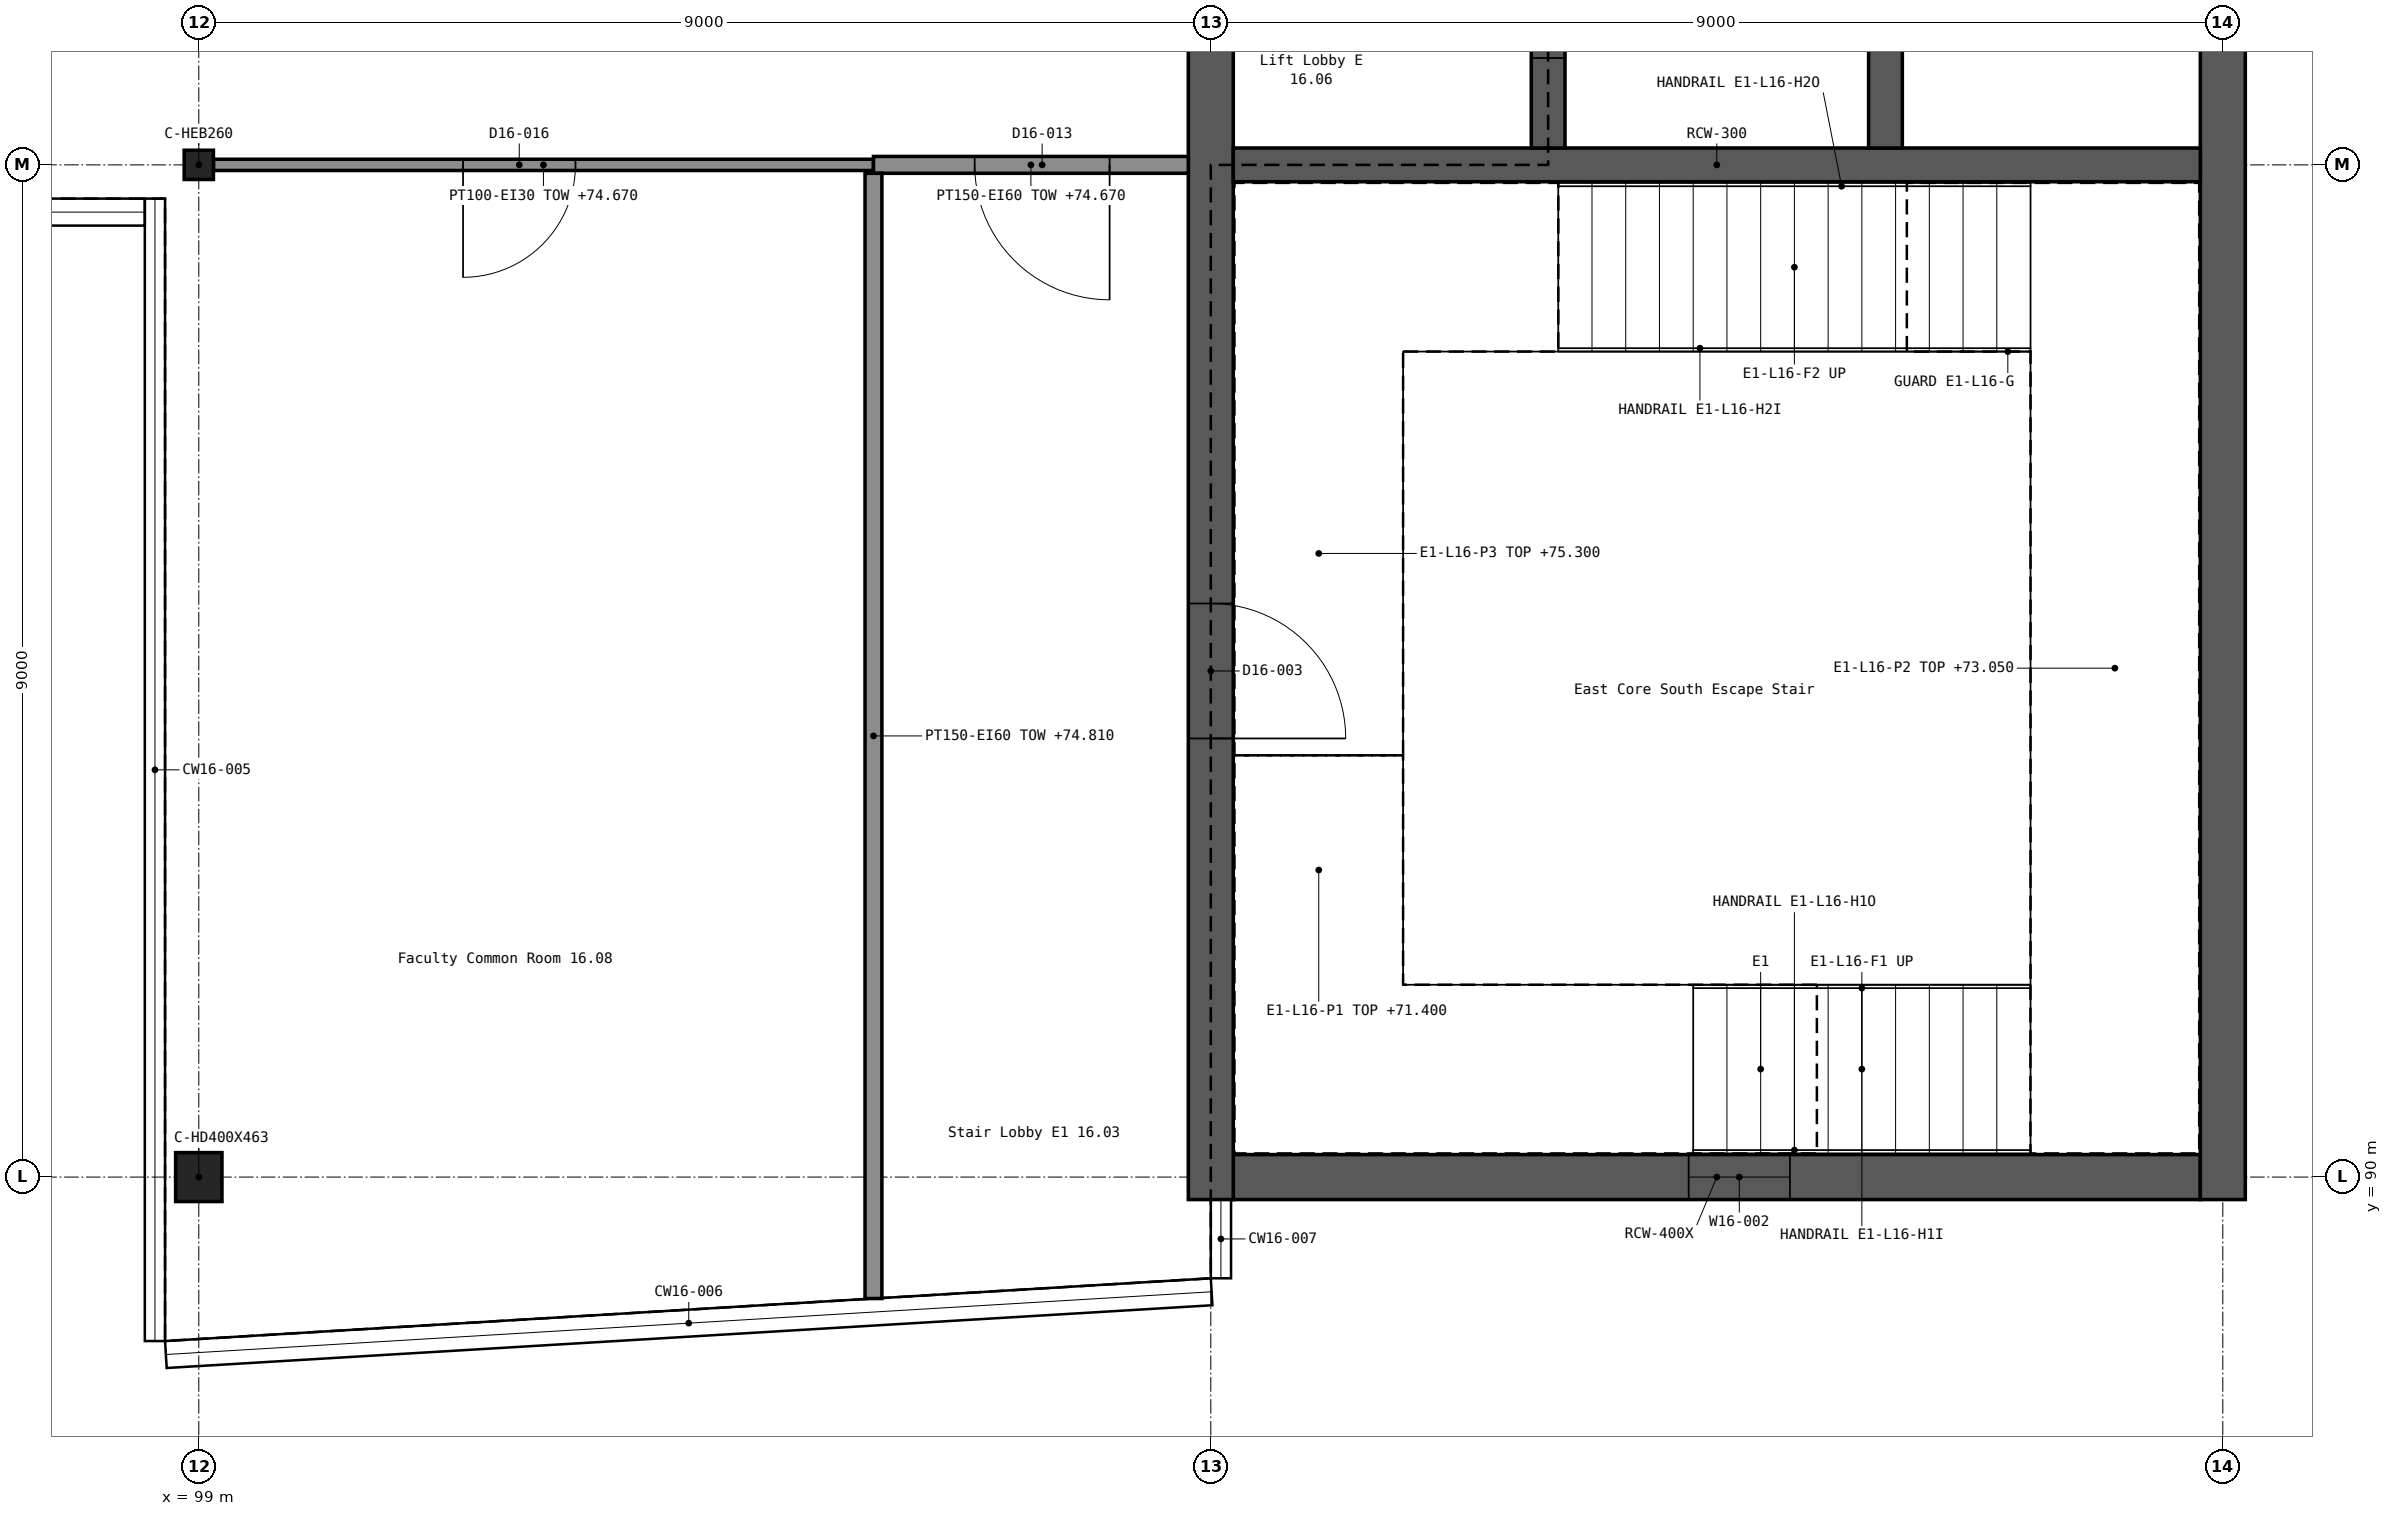
"""IFC4 building model, lengths in metres.
Left out: names, types, materials, properties, quantities, classifications, styles, units other than length and angle.
Written with IfcOpenShell. Run it as: python <this file> out.ifc"""

import sys

from ifc_helpers import new_model, si_unit, direction, frame, frame_2d, origin, origin_2d, place, context, subcontext, project, spatial, rectangle, i_section, extrude, element, fill, save


model = new_model("IFC4")
c1 = context("Model", 3, precision=1e-05, world=origin(), true_north=direction((0.0, 1.0)))
c2 = subcontext(c1, "Body", "Model", "MODEL_VIEW")
j1 = project(units=[si_unit("LENGTHUNIT", "METRE"), si_unit("PLANEANGLEUNIT", "RADIAN")], contexts=[c1])
p1 = place(None, origin())
s1 = spatial("IfcSite", under=j1, at=p1, CompositionType="ELEMENT")
p2 = place(p1, origin())
s2 = spatial("IfcBuilding", under=s1, at=p2, CompositionType="ELEMENT")
p3 = place(p2, frame((0.0, 0.0, 71.4)))
s3 = spatial("IfcBuildingStorey", under=s2, at=p3, CompositionType="ELEMENT", Elevation=71.4)
p4 = place(p3, frame((108.2, 90.0, 0.0), z_axis=(0.0, 0.0, 1.0), x_axis=(1.0, 0.0, 0.0)))
e1 = element("IfcWall", 1, at=p4, inside=s3, PredefinedType="SHEAR", context=c2, shape_type="SweptSolid", body=[
    extrude(rectangle(XDim=8.6, YDim=0.4, at=frame_2d((4.3, 0.0))), origin(), (0.0, 0.0, 1.0), 3.9),
])
p5 = place(p4, frame((4.05, 0.0, 1.2)))
e2 = element("IfcOpeningElement", 2, at=p5, cuts=e1, PredefinedType="OPENING", context=c2, shape_type="SweptSolid", body=[
    extrude(rectangle(XDim=0.9, YDim=1.5, at=frame_2d((0.45, 0.75))), frame((0.0, 0.211, 0.0), z_axis=(0.0, -1.0, 0.0), x_axis=(1.0, 0.0, 0.0)), (0.0, 0.0, 1.0), 0.422),
])
p6 = place(p3, frame((108.0, 89.8, 0.0), z_axis=(0.0, 0.0, 1.0), x_axis=(0.0, 1.0, 0.0)))
e3 = element("IfcWall", 3, at=p6, inside=s3, PredefinedType="SHEAR", context=c2, shape_type="SweptSolid", body=[
    extrude(rectangle(XDim=27.4, YDim=0.4, at=frame_2d((13.7, 0.0))), origin(), (0.0, 0.0, 1.0), 3.9),
])
p7 = place(p6, frame((4.1, 0.0, 0.0)))
e4 = element("IfcOpeningElement", 4, at=p7, cuts=e3, PredefinedType="OPENING", context=c2, shape_type="SweptSolid", body=[
    extrude(rectangle(XDim=1.2, YDim=2.1, at=frame_2d((0.6, 1.05))), frame((0.0, 0.211, 0.0), z_axis=(0.0, -1.0, 0.0), x_axis=(1.0, 0.0, 0.0)), (0.0, 0.0, 1.0), 0.422),
])
p8 = place(p6, frame((22.1, 0.0, 0.0)))
e5 = element("IfcOpeningElement", 5, at=p8, cuts=e3, PredefinedType="OPENING", context=c2, shape_type="SweptSolid", body=[
    extrude(rectangle(XDim=1.2, YDim=2.1, at=frame_2d((0.6, 1.05))), frame((0.0, 0.211, 0.0), z_axis=(0.0, -1.0, 0.0), x_axis=(1.0, 0.0, 0.0)), (0.0, 0.0, 1.0), 0.422),
])
p9 = place(p6, frame((12.5, 0.0, 0.0)))
e6 = element("IfcOpeningElement", 6, at=p9, cuts=e3, PredefinedType="OPENING", context=c2, shape_type="SweptSolid", body=[
    extrude(rectangle(XDim=2.0, YDim=2.1, at=frame_2d((1.0, 1.05))), frame((0.0, 0.211, 0.0), z_axis=(0.0, -1.0, 0.0), x_axis=(1.0, 0.0, 0.0)), (0.0, 0.0, 1.0), 0.422),
])
p10 = place(p3, frame((117.0, 89.8, 0.0), z_axis=(0.0, 0.0, 1.0), x_axis=(0.0, 1.0, 0.0)))
e7 = element("IfcWall", 7, at=p10, inside=s3, PredefinedType="SHEAR", context=c2, shape_type="SweptSolid", body=[
    extrude(rectangle(XDim=27.4, YDim=0.4, at=frame_2d((13.7, 0.0))), origin(), (0.0, 0.0, 1.0), 3.9),
])
p11 = place(p3, frame((108.2, 99.0, 0.0), z_axis=(0.0, 0.0, 1.0), x_axis=(1.0, 0.0, 0.0)))
e8 = element("IfcWall", 8, at=p11, inside=s3, PredefinedType="SHEAR", context=c2, shape_type="SweptSolid", body=[
    extrude(rectangle(XDim=8.6, YDim=0.3, at=frame_2d((4.3, 0.0))), origin(), (0.0, 0.0, 1.0), 3.9),
])
p12 = place(p3, frame((111.0, 99.15, 0.0), z_axis=(0.0, 0.0, 1.0), x_axis=(0.0, 1.0, 0.0)))
e9 = element("IfcWall", 9, at=p12, inside=s3, PredefinedType="SHEAR", context=c2, shape_type="SweptSolid", body=[
    extrude(rectangle(XDim=8.7, YDim=0.3, at=frame_2d((4.35, 0.0))), origin(), (0.0, 0.0, 1.0), 3.9),
])
p13 = place(p12, frame((0.8, 0.0, 0.0)))
e10 = element("IfcOpeningElement", 10, at=p13, cuts=e9, PredefinedType="OPENING", context=c2, shape_type="SweptSolid", body=[
    extrude(rectangle(XDim=1.1, YDim=2.1, at=frame_2d((0.55, 1.05))), frame((0.0, 0.161, 0.0), z_axis=(0.0, -1.0, 0.0), x_axis=(1.0, 0.0, 0.0)), (0.0, 0.0, 1.0), 0.322),
])
p14 = place(p12, frame((3.8, 0.0, 0.0)))
e11 = element("IfcOpeningElement", 11, at=p14, cuts=e9, PredefinedType="OPENING", context=c2, shape_type="SweptSolid", body=[
    extrude(rectangle(XDim=1.1, YDim=2.1, at=frame_2d((0.55, 1.05))), frame((0.0, 0.161, 0.0), z_axis=(0.0, -1.0, 0.0), x_axis=(1.0, 0.0, 0.0)), (0.0, 0.0, 1.0), 0.322),
])
p15 = place(p12, frame((6.8, 0.0, 0.0)))
e12 = element("IfcOpeningElement", 12, at=p15, cuts=e9, PredefinedType="OPENING", context=c2, shape_type="SweptSolid", body=[
    extrude(rectangle(XDim=1.1, YDim=2.1, at=frame_2d((0.55, 1.05))), frame((0.0, 0.161, 0.0), z_axis=(0.0, -1.0, 0.0), x_axis=(1.0, 0.0, 0.0)), (0.0, 0.0, 1.0), 0.322),
])
p16 = place(p3, frame((114.0, 99.15, 0.0), z_axis=(0.0, 0.0, 1.0), x_axis=(0.0, 1.0, 0.0)))
e13 = element("IfcWall", 13, at=p16, inside=s3, PredefinedType="SHEAR", context=c2, shape_type="SweptSolid", body=[
    extrude(rectangle(XDim=8.7, YDim=0.3, at=frame_2d((4.35, 0.0))), origin(), (0.0, 0.0, 1.0), 3.9),
])
p17 = place(p3, frame((99.0, 90.0, 0.0), z_axis=(0.0, 0.0, 1.0), x_axis=(1.0, 0.0, 0.0)))
e14 = element("IfcColumn", 14, at=p17, inside=s3, PredefinedType="COLUMN", context=c2, shape_type="SweptSolid", body=[
    extrude(i_section(OverallWidth=0.412, OverallDepth=0.435, WebThickness=0.036, FlangeThickness=0.057, FilletRadius=0.015, at=origin_2d()), origin(), (0.0, 0.0, 1.0), 3.9),
])
p18 = place(p3, frame((99.0, 99.0, 0.0), z_axis=(0.0, 0.0, 1.0), x_axis=(1.0, 0.0, 0.0)))
e15 = element("IfcColumn", 15, at=p18, inside=s3, PredefinedType="COLUMN", context=c2, shape_type="SweptSolid", body=[
    extrude(i_section(OverallWidth=0.26, OverallDepth=0.26, WebThickness=0.01, FlangeThickness=0.018, FilletRadius=0.024, at=origin_2d()), origin(), (0.0, 0.0, 1.0), 3.9),
])
p19 = place(p3, frame((99.13, 99.0, 0.0), z_axis=(0.0, 0.0, 1.0), x_axis=(1.0, 0.0, 0.0)))
e16 = element("IfcWall", 16, at=p19, inside=s3, PredefinedType="PARTITIONING", context=c2, shape_type="SweptSolid", body=[
    extrude(rectangle(XDim=5.87, YDim=0.1, at=frame_2d((2.935, 0.0))), origin(), (0.0, 0.0, 1.0), 3.27),
])
p20 = place(p19, frame((2.22, 0.0, 0.0)))
e17 = element("IfcOpeningElement", 17, at=p20, cuts=e16, PredefinedType="OPENING", context=c2, shape_type="SweptSolid", body=[
    extrude(rectangle(XDim=1.0, YDim=2.1, at=frame_2d((0.5, 1.05))), frame((0.0, 0.061, 0.0), z_axis=(0.0, -1.0, 0.0), x_axis=(1.0, 0.0, 0.0)), (0.0, 0.0, 1.0), 0.122),
])
p21 = place(p3, frame((105.0, 99.0, 0.0), z_axis=(0.0, 0.0, 1.0), x_axis=(1.0, 0.0, 0.0)))
e18 = element("IfcWall", 18, at=p21, inside=s3, PredefinedType="PARTITIONING", context=c2, shape_type="SweptSolid", body=[
    extrude(rectangle(XDim=2.8, YDim=0.15, at=frame_2d((1.4, 0.0))), origin(), (0.0, 0.0, 1.0), 3.27),
])
p22 = place(p21, frame((0.9, 0.0, 0.0)))
e19 = element("IfcOpeningElement", 19, at=p22, cuts=e18, PredefinedType="OPENING", context=c2, shape_type="SweptSolid", body=[
    extrude(rectangle(XDim=1.2, YDim=2.1, at=frame_2d((0.6, 1.05))), frame((0.0, 0.086, 0.0), z_axis=(0.0, -1.0, 0.0), x_axis=(1.0, 0.0, 0.0)), (0.0, 0.0, 1.0), 0.172),
])
p23 = place(p3, frame((105.0, 88.92, 0.0), z_axis=(0.0, 0.0, 1.0), x_axis=(0.0, 1.0, 0.0)))
e20 = element("IfcWall", 20, at=p23, inside=s3, PredefinedType="PARTITIONING", context=c2, shape_type="SweptSolid", body=[
    extrude(rectangle(XDim=10.005, YDim=0.15, at=frame_2d((5.002, 0.0))), origin(), (0.0, 0.0, 1.0), 3.41),
])
p24 = place(p5, origin())
e21 = element("IfcWindow", 21, at=p24, inside=s3, PartitioningType="SINGLE_PANEL", PredefinedType="WINDOW", context=c2, shape_type="SweptSolid", body=[
    extrude(rectangle(XDim=0.9, YDim=1.5, at=frame_2d((0.45, 0.75))), frame((0.0, 0.03, 0.0), z_axis=(0.0, -1.0, 0.0), x_axis=(1.0, 0.0, 0.0)), (0.0, 0.0, 1.0), 0.06),
])
fill(e2, e21)
p25 = place(p7, frame((1.2, 0.0, 0.0), z_axis=(0.0, 0.0, 1.0), x_axis=(-1.0, 0.0, 0.0)))
e22 = element("IfcDoor", 22, at=p25, inside=s3, OperationType="SINGLE_SWING_RIGHT", PredefinedType="DOOR", context=c2, shape_type="SweptSolid", body=[
    extrude(rectangle(XDim=1.2, YDim=2.1, at=frame_2d((0.6, 1.05))), frame((0.0, 0.025, 0.0), z_axis=(0.0, -1.0, 0.0), x_axis=(1.0, 0.0, 0.0)), (0.0, 0.0, 1.0), 0.05),
])
fill(e4, e22)
p26 = place(p13, origin())
e23 = element("IfcDoor", 23, at=p26, inside=s3, OperationType="DOUBLE_DOOR_SLIDING", PredefinedType="DOOR", context=c2, shape_type="SweptSolid", body=[
    extrude(rectangle(XDim=1.1, YDim=2.1, at=frame_2d((0.55, 1.05))), frame((0.0, 0.025, 0.0), z_axis=(0.0, -1.0, 0.0), x_axis=(1.0, 0.0, 0.0)), (0.0, 0.0, 1.0), 0.05),
])
fill(e10, e23)
p27 = place(p22, frame((1.2, 0.0, 0.0), z_axis=(0.0, 0.0, 1.0), x_axis=(-1.0, 0.0, 0.0)))
e24 = element("IfcDoor", 24, at=p27, inside=s3, OperationType="SINGLE_SWING_LEFT", PredefinedType="DOOR", context=c2, shape_type="SweptSolid", body=[
    extrude(rectangle(XDim=1.2, YDim=2.1, at=frame_2d((0.6, 1.05))), frame((0.0, 0.025, 0.0), z_axis=(0.0, -1.0, 0.0), x_axis=(1.0, 0.0, 0.0)), (0.0, 0.0, 1.0), 0.05),
])
fill(e19, e24)
p28 = place(p20, frame((1.0, 0.0, 0.0), z_axis=(0.0, 0.0, 1.0), x_axis=(-1.0, 0.0, 0.0)))
e25 = element("IfcDoor", 25, at=p28, inside=s3, OperationType="SINGLE_SWING_RIGHT", PredefinedType="DOOR", context=c2, shape_type="SweptSolid", body=[
    extrude(rectangle(XDim=1.0, YDim=2.1, at=frame_2d((0.5, 1.05))), frame((0.0, 0.025, 0.0), z_axis=(0.0, -1.0, 0.0), x_axis=(1.0, 0.0, 0.0)), (0.0, 0.0, 1.0), 0.05),
])
fill(e17, e25)
save(model, sys.argv[1])
